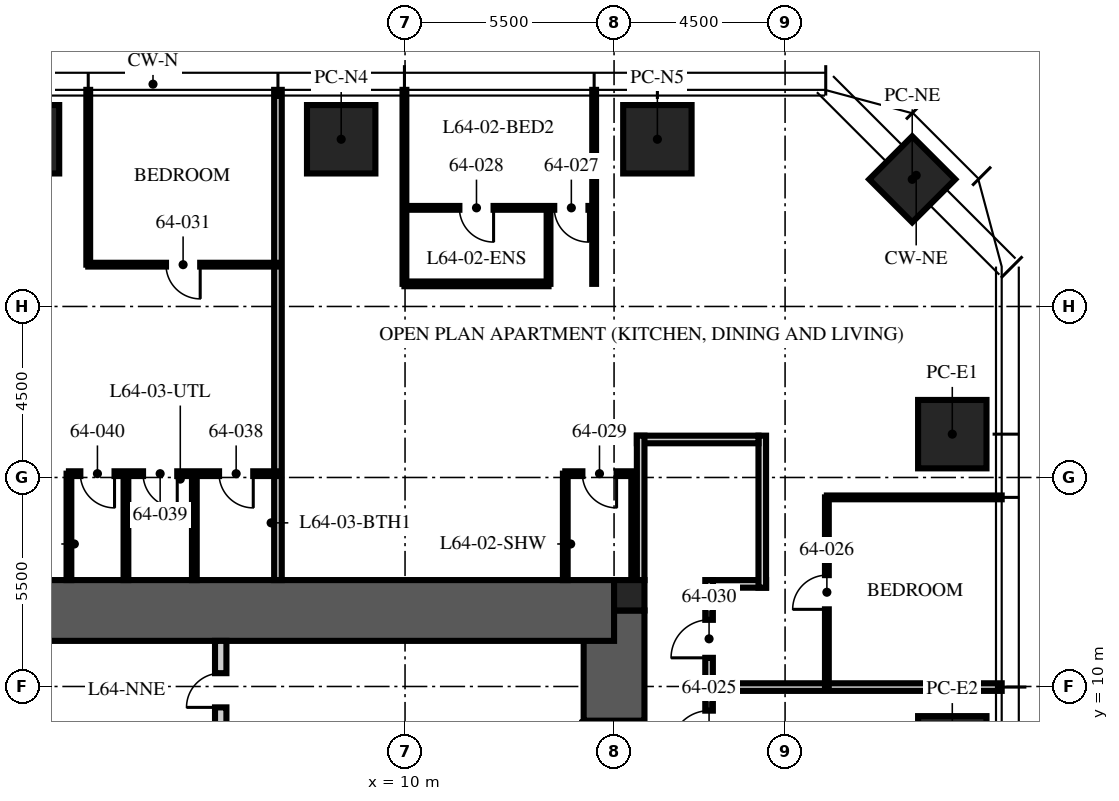
"""IFC4 building model, lengths in metres.
Left out: names, types, materials, properties, quantities, classifications, styles, units other than length and angle.
Written with IfcOpenShell. Run it as: python <this file> out.ifc"""

import sys

from ifc_helpers import new_model, si_unit, direction, frame, frame_2d, origin, origin_2d, place, context, subcontext, project, spatial, rectangle, extrude, element, fill, save


model = new_model("IFC4")
c1 = context("Model", 3, precision=1e-05, world=origin(), true_north=direction((0.0, 1.0)))
c2 = subcontext(c1, "Body", "Model", "MODEL_VIEW")
j1 = project(units=[si_unit("LENGTHUNIT", "METRE"), si_unit("PLANEANGLEUNIT", "RADIAN")], contexts=[c1])
p1 = place(None, origin())
s1 = spatial("IfcSite", under=j1, at=p1, CompositionType="ELEMENT")
p2 = place(p1, origin())
s2 = spatial("IfcBuilding", under=s1, at=p2, CompositionType="ELEMENT")
p3 = place(p2, frame((0.0, 0.0, 255.75)))
s3 = spatial("IfcBuildingStorey", under=s2, at=p3, CompositionType="ELEMENT", Elevation=255.75)
p4 = place(p3, frame((15.5, -12.0, -0.25), z_axis=(0.0, 0.0, 1.0), x_axis=(0.0, 1.0, 0.0)))
e1 = element("IfcWall", 1, at=p4, inside=s3, PredefinedType="SHEAR", context=c2, shape_type="SweptSolid", body=[
    extrude(rectangle(XDim=24.0, YDim=1.6, at=frame_2d((12.0, 0.0))), origin(), (0.0, 0.0, 1.0), 3.75),
])
p5 = place(p4, frame((3.2, 0.0, 0.25)))
e2 = element("IfcOpeningElement", 2, at=p5, cuts=e1, PredefinedType="OPENING", context=c2, shape_type="SweptSolid", body=[
    extrude(rectangle(XDim=1.2, YDim=2.1, at=frame_2d((0.6, 1.05))), frame((0.0, 0.81, 0.0), z_axis=(0.0, -1.0, 0.0), x_axis=(1.0, 0.0, 0.0)), (0.0, 0.0, 1.0), 1.62),
])
p6 = place(p4, frame((19.3, 0.0, 0.25)))
e3 = element("IfcOpeningElement", 3, at=p6, cuts=e1, PredefinedType="OPENING", context=c2, shape_type="SweptSolid", body=[
    extrude(rectangle(XDim=1.8, YDim=2.1, at=frame_2d((0.9, 1.05))), frame((0.0, 0.81, 0.0), z_axis=(0.0, -1.0, 0.0), x_axis=(1.0, 0.0, 0.0)), (0.0, 0.0, 1.0), 1.62),
])
p7 = place(p3, frame((-15.5, 12.0, -0.25), z_axis=(0.0, 0.0, 1.0), x_axis=(1.0, 0.0, 0.0)))
e4 = element("IfcWall", 4, at=p7, inside=s3, PredefinedType="SHEAR", context=c2, shape_type="SweptSolid", body=[
    extrude(rectangle(XDim=31.0, YDim=1.6, at=frame_2d((15.5, 0.0))), origin(), (0.0, 0.0, 1.0), 3.75),
])
p8 = place(p3, frame((15.9, 12.4, -0.25), z_axis=(0.0, 0.0, 1.0), x_axis=(1.0, 0.0, 0.0)))
e5 = element("IfcColumn", 5, at=p8, inside=s3, PredefinedType="COLUMN", context=c2, shape_type="SweptSolid", body=[
    extrude(rectangle(XDim=0.8, YDim=0.8, at=origin_2d()), origin(), (0.0, 0.0, 1.0), 3.75),
])
for number, where, z_axis, x_axis in (
    (6, (0.0, 24.4, 0.0), (0.0, 0.0, 1.0), (1.0, 0.0, 0.0)),
    (7, (8.32, 24.4, 0.0), (0.0, 0.0, 1.0), (1.0, 0.0, 0.0)),
    (8, (16.64, 24.4, 0.0), (0.0, 0.0, 1.0), (1.0, 0.0, 0.0)),
    (9, (24.4, 16.64, 0.0), (0.0, 0.0, 1.0), (0.0, 1.0, 0.0)),
    (10, (24.4, 8.32, 0.0), (0.0, 0.0, 1.0), (0.0, 1.0, 0.0)),
):
    element("IfcColumn", number, at=place(p3, frame(where, z_axis=z_axis, x_axis=x_axis)), inside=s3, PredefinedType="COLUMN", context=c2, shape_type="SweptSolid", body=[
        extrude(rectangle(XDim=1.8, YDim=1.8, at=origin_2d()), origin(), (0.0, 0.0, 1.0), 3.75),
    ])
p9 = place(p3, frame((23.346, 23.346, 0.0), z_axis=(0.0, 0.0, 1.0), x_axis=(0.707106781187, -0.707106781187, 0.0)))
e11 = element("IfcColumn", 11, at=p9, inside=s3, PredefinedType="COLUMN", context=c2, shape_type="SweptSolid", body=[
    extrude(rectangle(XDim=1.6, YDim=1.6, at=origin_2d()), origin(), (0.0, 0.0, 1.0), 3.75),
])
p10 = place(p3, frame((5.15, 5.3, 0.0), z_axis=(0.0, 0.0, 1.0), x_axis=(0.0, 1.0, 0.0)))
e12 = element("IfcWall", 12, at=p10, inside=s3, PredefinedType="PARTITIONING", context=c2, shape_type="SweptSolid", body=[
    extrude(rectangle(XDim=5.9, YDim=0.3, at=frame_2d((2.95, 0.0))), origin(), (0.0, 0.0, 1.0), 3.5),
])
p11 = place(p10, frame((4.15, 0.0, 0.0)))
e13 = element("IfcOpeningElement", 13, at=p11, cuts=e12, PredefinedType="OPENING", context=c2, shape_type="SweptSolid", body=[
    extrude(rectangle(XDim=0.9, YDim=2.1, at=frame_2d((0.45, 1.05))), frame((0.0, 0.16, 0.0), z_axis=(0.0, -1.0, 0.0), x_axis=(1.0, 0.0, 0.0)), (0.0, 0.0, 1.0), 0.32),
])
p12 = place(p3, frame((18.1, 12.7, 0.0), z_axis=(0.0, 0.0, 1.0), x_axis=(1.0, 0.0, 0.0)))
e14 = element("IfcWall", 14, at=p12, inside=s3, PredefinedType="PARTITIONING", context=c2, shape_type="SweptSolid", body=[
    extrude(rectangle(XDim=1.4, YDim=0.2, at=frame_2d((0.7, 0.0))), origin(), (0.0, 0.0, 1.0), 2.81),
])
p13 = place(p3, frame((19.4, 12.6, 0.0), z_axis=(0.0, 0.0, 1.0), x_axis=(0.0, 1.0, 0.0)))
e15 = element("IfcWall", 15, at=p13, inside=s3, PredefinedType="PARTITIONING", context=c2, shape_type="SweptSolid", body=[
    extrude(rectangle(XDim=4.0, YDim=0.2, at=frame_2d((2.0, 0.0))), origin(), (0.0, 0.0, 1.0), 2.6),
])
p14 = place(p3, frame((19.3, 16.5, 0.0), z_axis=(0.0, 0.0, 1.0), x_axis=(-1.0, 0.0, 0.0)))
e16 = element("IfcWall", 16, at=p14, inside=s3, PredefinedType="PARTITIONING", context=c2, shape_type="SweptSolid", body=[
    extrude(rectangle(XDim=3.2, YDim=0.2, at=frame_2d((1.6, 0.0))), origin(), (0.0, 0.0, 1.0), 2.3),
])
p15 = place(p3, frame((16.2, 16.6, 0.0), z_axis=(0.0, 0.0, 1.0), x_axis=(0.0, -1.0, 0.0)))
e17 = element("IfcWall", 17, at=p15, inside=s3, PredefinedType="PARTITIONING", context=c2, shape_type="SweptSolid", body=[
    extrude(rectangle(XDim=3.8, YDim=0.2, at=frame_2d((1.9, 0.0))), origin(), (0.0, 0.0, 1.0), 2.3),
])
p16 = place(p3, frame((18.1, 9.984, 0.0), z_axis=(0.0, 0.0, 1.0), x_axis=(1.0, 0.0, 0.0)))
e18 = element("IfcWall", 18, at=p16, inside=s3, PredefinedType="PARTITIONING", context=c2, shape_type="SweptSolid", body=[
    extrude(rectangle(XDim=7.6, YDim=0.2, at=frame_2d((3.8, 0.0))), origin(), (0.0, 0.0, 1.0), 2.91),
])
p17 = place(p3, frame((21.1, 14.976, 0.0), z_axis=(0.0, 0.0, 1.0), x_axis=(1.0, 0.0, 0.0)))
e19 = element("IfcWall", 19, at=p17, inside=s3, PredefinedType="PARTITIONING", context=c2, shape_type="SweptSolid", body=[
    extrude(rectangle(XDim=4.6, YDim=0.1, at=frame_2d((2.3, 0.0))), origin(), (0.0, 0.0, 1.0), 2.91),
])
for number, where, z_axis, x_axis in (
    (20, (14.976, 20.595, 0.0), (0.0, 0.0, 1.0), (0.0, 1.0, 0.0)),
    (21, (9.984, 20.595, 0.0), (0.0, 0.0, 1.0), (0.0, 1.0, 0.0)),
):
    element("IfcWall", number, at=place(p3, frame(where, z_axis=z_axis, x_axis=x_axis)), inside=s3, PredefinedType="PARTITIONING", context=c2, shape_type="SweptSolid", body=[
        extrude(rectangle(XDim=5.105, YDim=0.1, at=frame_2d((2.552, 0.0))), origin(), (0.0, 0.0, 1.0), 2.91),
    ])
p18 = place(p3, frame((6.656, 12.8, 0.0), z_axis=(0.0, 0.0, 1.0), x_axis=(0.0, 1.0, 0.0)))
e22 = element("IfcWall", 22, at=p18, inside=s3, PredefinedType="PARTITIONING", context=c2, shape_type="SweptSolid", body=[
    extrude(rectangle(XDim=12.9, YDim=0.2, at=frame_2d((6.45, 0.0))), origin(), (0.0, 0.0, 1.0), 2.91),
])
p19 = place(p3, frame((1.664, 21.1, 0.0), z_axis=(0.0, 0.0, 1.0), x_axis=(0.0, 1.0, 0.0)))
e23 = element("IfcWall", 23, at=p19, inside=s3, PredefinedType="PARTITIONING", context=c2, shape_type="SweptSolid", body=[
    extrude(rectangle(XDim=4.6, YDim=0.1, at=frame_2d((2.3, 0.0))), origin(), (0.0, 0.0, 1.0), 2.91),
])
p20 = place(p3, frame((21.1, 9.984, 0.0), z_axis=(0.0, 0.0, 1.0), x_axis=(0.0, 1.0, 0.0)))
e24 = element("IfcWall", 24, at=p20, inside=s3, PredefinedType="PARTITIONING", context=c2, shape_type="SweptSolid", body=[
    extrude(rectangle(XDim=4.992, YDim=0.1, at=frame_2d((2.496, 0.0))), origin(), (0.0, 0.0, 1.0), 2.81),
])
p21 = place(p20, frame((2.046, 0.0, 0.0)))
e25 = element("IfcOpeningElement", 25, at=p21, cuts=e24, PredefinedType="OPENING", context=c2, shape_type="SweptSolid", body=[
    extrude(rectangle(XDim=0.9, YDim=2.1, at=frame_2d((0.45, 1.05))), frame((0.0, 0.06, 0.0), z_axis=(0.0, -1.0, 0.0), x_axis=(1.0, 0.0, 0.0)), (0.0, 0.0, 1.0), 0.12),
])
p22 = place(p3, frame((14.976, 22.595, 0.0), z_axis=(0.0, 0.0, 1.0), x_axis=(-1.0, 0.0, 0.0)))
e26 = element("IfcWall", 26, at=p22, inside=s3, PredefinedType="PARTITIONING", context=c2, shape_type="SweptSolid", body=[
    extrude(rectangle(XDim=4.992, YDim=0.1, at=frame_2d((2.496, 0.0))), origin(), (0.0, 0.0, 1.0), 2.81),
])
p23 = place(p22, frame((0.15, 0.0, 0.0)))
e27 = element("IfcOpeningElement", 27, at=p23, cuts=e26, PredefinedType="OPENING", context=c2, shape_type="SweptSolid", body=[
    extrude(rectangle(XDim=0.9, YDim=2.1, at=frame_2d((0.45, 1.05))), frame((0.0, 0.06, 0.0), z_axis=(0.0, -1.0, 0.0), x_axis=(1.0, 0.0, 0.0)), (0.0, 0.0, 1.0), 0.12),
])
p24 = place(p22, frame((2.646, 0.0, 0.0)))
e28 = element("IfcOpeningElement", 28, at=p24, cuts=e26, PredefinedType="OPENING", context=c2, shape_type="SweptSolid", body=[
    extrude(rectangle(XDim=0.9, YDim=2.1, at=frame_2d((0.45, 1.05))), frame((0.0, 0.06, 0.0), z_axis=(0.0, -1.0, 0.0), x_axis=(1.0, 0.0, 0.0)), (0.0, 0.0, 1.0), 0.12),
])
p25 = place(p3, frame((13.776, 20.595, 0.0), z_axis=(0.0, 0.0, 1.0), x_axis=(0.0, 1.0, 0.0)))
e29 = element("IfcWall", 29, at=p25, inside=s3, PredefinedType="PARTITIONING", context=c2, shape_type="SweptSolid", body=[
    extrude(rectangle(XDim=2.0, YDim=0.1, at=frame_2d((1.0, 0.0))), origin(), (0.0, 0.0, 1.0), 3.5),
])
p26 = place(p3, frame((13.776, 20.595, 0.0), z_axis=(0.0, 0.0, 1.0), x_axis=(-1.0, 0.0, 0.0)))
e30 = element("IfcWall", 30, at=p26, inside=s3, PredefinedType="PARTITIONING", context=c2, shape_type="SweptSolid", body=[
    extrude(rectangle(XDim=3.792, YDim=0.125, at=frame_2d((1.896, 0.0))), origin(), (0.0, 0.0, 1.0), 2.81),
])
p27 = place(p3, frame((16.017, 15.6, 0.0), z_axis=(0.0, 0.0, 1.0), x_axis=(-1.0, 0.0, 0.0)))
e31 = element("IfcWall", 31, at=p27, inside=s3, PredefinedType="PARTITIONING", context=c2, shape_type="SweptSolid", body=[
    extrude(rectangle(XDim=1.8, YDim=0.125, at=frame_2d((0.9, 0.0))), origin(), (0.0, 0.0, 1.0), 3.5),
])
p28 = place(p27, frame((0.45, 0.0, 0.0)))
e32 = element("IfcOpeningElement", 32, at=p28, cuts=e31, PredefinedType="OPENING", context=c2, shape_type="SweptSolid", body=[
    extrude(rectangle(XDim=0.9, YDim=2.1, at=frame_2d((0.45, 1.05))), frame((0.0, 0.073, 0.0), z_axis=(0.0, -1.0, 0.0), x_axis=(1.0, 0.0, 0.0)), (0.0, 0.0, 1.0), 0.145),
])
p29 = place(p3, frame((16.017, 12.8, 0.0), z_axis=(0.0, 0.0, 1.0), x_axis=(0.0, 1.0, 0.0)))
e33 = element("IfcWall", 33, at=p29, inside=s3, PredefinedType="PARTITIONING", context=c2, shape_type="SweptSolid", body=[
    extrude(rectangle(XDim=2.8, YDim=0.125, at=frame_2d((1.4, 0.0))), origin(), (0.0, 0.0, 1.0), 2.3),
])
p30 = place(p3, frame((14.217, 12.8, 0.0), z_axis=(0.0, 0.0, 1.0), x_axis=(0.0, 1.0, 0.0)))
e34 = element("IfcWall", 34, at=p30, inside=s3, PredefinedType="PARTITIONING", context=c2, shape_type="SweptSolid", body=[
    extrude(rectangle(XDim=2.8, YDim=0.125, at=frame_2d((1.4, 0.0))), origin(), (0.0, 0.0, 1.0), 3.5),
])
p31 = place(p3, frame((6.656, 21.1, 0.0), z_axis=(0.0, 0.0, 1.0), x_axis=(-1.0, 0.0, 0.0)))
e35 = element("IfcWall", 35, at=p31, inside=s3, PredefinedType="PARTITIONING", context=c2, shape_type="SweptSolid", body=[
    extrude(rectangle(XDim=4.992, YDim=0.1, at=frame_2d((2.496, 0.0))), origin(), (0.0, 0.0, 1.0), 2.81),
])
p32 = place(p31, frame((2.046, 0.0, 0.0)))
e36 = element("IfcOpeningElement", 36, at=p32, cuts=e35, PredefinedType="OPENING", context=c2, shape_type="SweptSolid", body=[
    extrude(rectangle(XDim=0.9, YDim=2.1, at=frame_2d((0.45, 1.05))), frame((0.0, 0.06, 0.0), z_axis=(0.0, -1.0, 0.0), x_axis=(1.0, 0.0, 0.0)), (0.0, 0.0, 1.0), 0.12),
])
p33 = place(p3, frame((6.656, 15.6, 0.0), z_axis=(0.0, 0.0, 1.0), x_axis=(-1.0, 0.0, 0.0)))
e37 = element("IfcWall", 37, at=p33, inside=s3, PredefinedType="PARTITIONING", context=c2, shape_type="SweptSolid", body=[
    extrude(rectangle(XDim=5.5, YDim=0.125, at=frame_2d((2.75, 0.0))), origin(), (0.0, 0.0, 1.0), 2.81),
])
p34 = place(p33, frame((0.65, 0.0, 0.0)))
e38 = element("IfcOpeningElement", 38, at=p34, cuts=e37, PredefinedType="OPENING", context=c2, shape_type="SweptSolid", body=[
    extrude(rectangle(XDim=0.9, YDim=2.1, at=frame_2d((0.45, 1.05))), frame((0.0, 0.073, 0.0), z_axis=(0.0, -1.0, 0.0), x_axis=(1.0, 0.0, 0.0)), (0.0, 0.0, 1.0), 0.145),
])
p35 = place(p33, frame((2.65, 0.0, 0.0)))
e39 = element("IfcOpeningElement", 39, at=p35, cuts=e37, PredefinedType="OPENING", context=c2, shape_type="SweptSolid", body=[
    extrude(rectangle(XDim=0.9, YDim=2.1, at=frame_2d((0.45, 1.05))), frame((0.0, 0.073, 0.0), z_axis=(0.0, -1.0, 0.0), x_axis=(1.0, 0.0, 0.0)), (0.0, 0.0, 1.0), 0.145),
])
p36 = place(p33, frame((4.3, 0.0, 0.0)))
e40 = element("IfcOpeningElement", 40, at=p36, cuts=e37, PredefinedType="OPENING", context=c2, shape_type="SweptSolid", body=[
    extrude(rectangle(XDim=0.9, YDim=2.1, at=frame_2d((0.45, 1.05))), frame((0.0, 0.073, 0.0), z_axis=(0.0, -1.0, 0.0), x_axis=(1.0, 0.0, 0.0)), (0.0, 0.0, 1.0), 0.145),
])
for number, where, z_axis, x_axis in (
    (41, (4.456, 12.8, 0.0), (0.0, 0.0, 1.0), (0.0, 1.0, 0.0)),
    (42, (2.656, 12.8, 0.0), (0.0, 0.0, 1.0), (0.0, 1.0, 0.0)),
    (43, (1.156, 12.8, 0.0), (0.0, 0.0, 1.0), (0.0, 1.0, 0.0)),
):
    element("IfcWall", number, at=place(p3, frame(where, z_axis=z_axis, x_axis=x_axis)), inside=s3, PredefinedType="PARTITIONING", context=c2, shape_type="SweptSolid", body=[
        extrude(rectangle(XDim=2.8, YDim=0.125, at=frame_2d((1.4, 0.0))), origin(), (0.0, 0.0, 1.0), 3.5),
    ])
p37 = place(p3, frame((18.0, -13.0, 0.0), z_axis=(0.0, 0.0, 1.0), x_axis=(0.0, 1.0, 0.0)))
e44 = element("IfcWall", 44, at=p37, inside=s3, PredefinedType="PARTITIONING", context=c2, shape_type="SweptSolid", body=[
    extrude(rectangle(XDim=25.8, YDim=0.2, at=frame_2d((12.9, 0.0))), origin(), (0.0, 0.0, 1.0), 2.6),
])
p38 = place(p37, frame((21.364, 0.0, 0.0)))
e45 = element("IfcOpeningElement", 45, at=p38, cuts=e44, PredefinedType="OPENING", context=c2, shape_type="SweptSolid", body=[
    extrude(rectangle(XDim=1.0, YDim=2.2, at=frame_2d((0.5, 1.1))), frame((0.0, 0.11, 0.0), z_axis=(0.0, -1.0, 0.0), x_axis=(1.0, 0.0, 0.0)), (0.0, 0.0, 1.0), 0.22),
])
p39 = place(p37, frame((23.754, 0.0, 0.0)))
e46 = element("IfcOpeningElement", 46, at=p39, cuts=e44, PredefinedType="OPENING", context=c2, shape_type="SweptSolid", body=[
    extrude(rectangle(XDim=1.0, YDim=2.2, at=frame_2d((0.5, 1.1))), frame((0.0, 0.11, 0.0), z_axis=(0.0, -1.0, 0.0), x_axis=(1.0, 0.0, 0.0)), (0.0, 0.0, 1.0), 0.22),
])
p40 = place(p37, frame((4.6, 0.0, 0.0)))
e47 = element("IfcOpeningElement", 47, at=p40, cuts=e44, PredefinedType="OPENING", context=c2, shape_type="SweptSolid", body=[
    extrude(rectangle(XDim=1.0, YDim=2.2, at=frame_2d((0.5, 1.1))), frame((0.0, 0.11, 0.0), z_axis=(0.0, -1.0, 0.0), x_axis=(1.0, 0.0, 0.0)), (0.0, 0.0, 1.0), 0.22),
])
p41 = place(p6, origin())
e48 = element("IfcDoor", 48, at=p41, inside=s3, OperationType="DOUBLE_DOOR_SINGLE_SWING", PredefinedType="DOOR", context=c2, shape_type="SweptSolid", body=[
    extrude(rectangle(XDim=1.8, YDim=2.1, at=frame_2d((0.9, 1.05))), frame((0.0, 0.025, 0.0), z_axis=(0.0, -1.0, 0.0), x_axis=(1.0, 0.0, 0.0)), (0.0, 0.0, 1.0), 0.05),
])
fill(e3, e48)
p42 = place(p11, origin())
e49 = element("IfcDoor", 49, at=p42, inside=s3, OperationType="SINGLE_SWING_LEFT", PredefinedType="DOOR", context=c2, shape_type="SweptSolid", body=[
    extrude(rectangle(XDim=0.9, YDim=2.1, at=frame_2d((0.45, 1.05))), frame((0.0, 0.025, 0.0), z_axis=(0.0, -1.0, 0.0), x_axis=(1.0, 0.0, 0.0)), (0.0, 0.0, 1.0), 0.05),
])
fill(e13, e49)
p43 = place(p38, origin())
e50 = element("IfcDoor", 50, at=p43, inside=s3, OperationType="SINGLE_SWING_LEFT", PredefinedType="DOOR", context=c2, shape_type="SweptSolid", body=[
    extrude(rectangle(XDim=1.0, YDim=2.2, at=frame_2d((0.5, 1.1))), frame((0.0, 0.025, 0.0), z_axis=(0.0, -1.0, 0.0), x_axis=(1.0, 0.0, 0.0)), (0.0, 0.0, 1.0), 0.05),
])
fill(e45, e50)
p44 = place(p21, origin())
e51 = element("IfcDoor", 51, at=p44, inside=s3, OperationType="SINGLE_SWING_LEFT", PredefinedType="DOOR", context=c2, shape_type="SweptSolid", body=[
    extrude(rectangle(XDim=0.9, YDim=2.1, at=frame_2d((0.45, 1.05))), frame((0.0, 0.025, 0.0), z_axis=(0.0, -1.0, 0.0), x_axis=(1.0, 0.0, 0.0)), (0.0, 0.0, 1.0), 0.05),
])
fill(e25, e51)
p45 = place(p23, origin())
e52 = element("IfcDoor", 52, at=p45, inside=s3, OperationType="SINGLE_SWING_LEFT", PredefinedType="DOOR", context=c2, shape_type="SweptSolid", body=[
    extrude(rectangle(XDim=0.9, YDim=2.1, at=frame_2d((0.45, 1.05))), frame((0.0, 0.025, 0.0), z_axis=(0.0, -1.0, 0.0), x_axis=(1.0, 0.0, 0.0)), (0.0, 0.0, 1.0), 0.05),
])
fill(e27, e52)
p46 = place(p24, origin())
e53 = element("IfcDoor", 53, at=p46, inside=s3, OperationType="SINGLE_SWING_LEFT", PredefinedType="DOOR", context=c2, shape_type="SweptSolid", body=[
    extrude(rectangle(XDim=0.9, YDim=2.1, at=frame_2d((0.45, 1.05))), frame((0.0, 0.025, 0.0), z_axis=(0.0, -1.0, 0.0), x_axis=(1.0, 0.0, 0.0)), (0.0, 0.0, 1.0), 0.05),
])
fill(e28, e53)
p47 = place(p28, origin())
e54 = element("IfcDoor", 54, at=p47, inside=s3, OperationType="SINGLE_SWING_LEFT", PredefinedType="DOOR", context=c2, shape_type="SweptSolid", body=[
    extrude(rectangle(XDim=0.9, YDim=2.1, at=frame_2d((0.45, 1.05))), frame((0.0, 0.025, 0.0), z_axis=(0.0, -1.0, 0.0), x_axis=(1.0, 0.0, 0.0)), (0.0, 0.0, 1.0), 0.05),
])
fill(e32, e54)
p48 = place(p39, origin())
e55 = element("IfcDoor", 55, at=p48, inside=s3, OperationType="SINGLE_SWING_LEFT", PredefinedType="DOOR", context=c2, shape_type="SweptSolid", body=[
    extrude(rectangle(XDim=1.0, YDim=2.2, at=frame_2d((0.5, 1.1))), frame((0.0, 0.025, 0.0), z_axis=(0.0, -1.0, 0.0), x_axis=(1.0, 0.0, 0.0)), (0.0, 0.0, 1.0), 0.05),
])
fill(e46, e55)
p49 = place(p32, origin())
e56 = element("IfcDoor", 56, at=p49, inside=s3, OperationType="SINGLE_SWING_LEFT", PredefinedType="DOOR", context=c2, shape_type="SweptSolid", body=[
    extrude(rectangle(XDim=0.9, YDim=2.1, at=frame_2d((0.45, 1.05))), frame((0.0, 0.025, 0.0), z_axis=(0.0, -1.0, 0.0), x_axis=(1.0, 0.0, 0.0)), (0.0, 0.0, 1.0), 0.05),
])
fill(e36, e56)
p50 = place(p34, origin())
e57 = element("IfcDoor", 57, at=p50, inside=s3, OperationType="SINGLE_SWING_LEFT", PredefinedType="DOOR", context=c2, shape_type="SweptSolid", body=[
    extrude(rectangle(XDim=0.9, YDim=2.1, at=frame_2d((0.45, 1.05))), frame((0.0, 0.025, 0.0), z_axis=(0.0, -1.0, 0.0), x_axis=(1.0, 0.0, 0.0)), (0.0, 0.0, 1.0), 0.05),
])
fill(e38, e57)
p51 = place(p35, origin())
e58 = element("IfcDoor", 58, at=p51, inside=s3, OperationType="SINGLE_SWING_LEFT", PredefinedType="DOOR", context=c2, shape_type="SweptSolid", body=[
    extrude(rectangle(XDim=0.9, YDim=2.1, at=frame_2d((0.45, 1.05))), frame((0.0, 0.025, 0.0), z_axis=(0.0, -1.0, 0.0), x_axis=(1.0, 0.0, 0.0)), (0.0, 0.0, 1.0), 0.05),
])
fill(e39, e58)
p52 = place(p36, origin())
e59 = element("IfcDoor", 59, at=p52, inside=s3, OperationType="SINGLE_SWING_LEFT", PredefinedType="DOOR", context=c2, shape_type="SweptSolid", body=[
    extrude(rectangle(XDim=0.9, YDim=2.1, at=frame_2d((0.45, 1.05))), frame((0.0, 0.025, 0.0), z_axis=(0.0, -1.0, 0.0), x_axis=(1.0, 0.0, 0.0)), (0.0, 0.0, 1.0), 0.05),
])
fill(e40, e59)
save(model, sys.argv[1])
